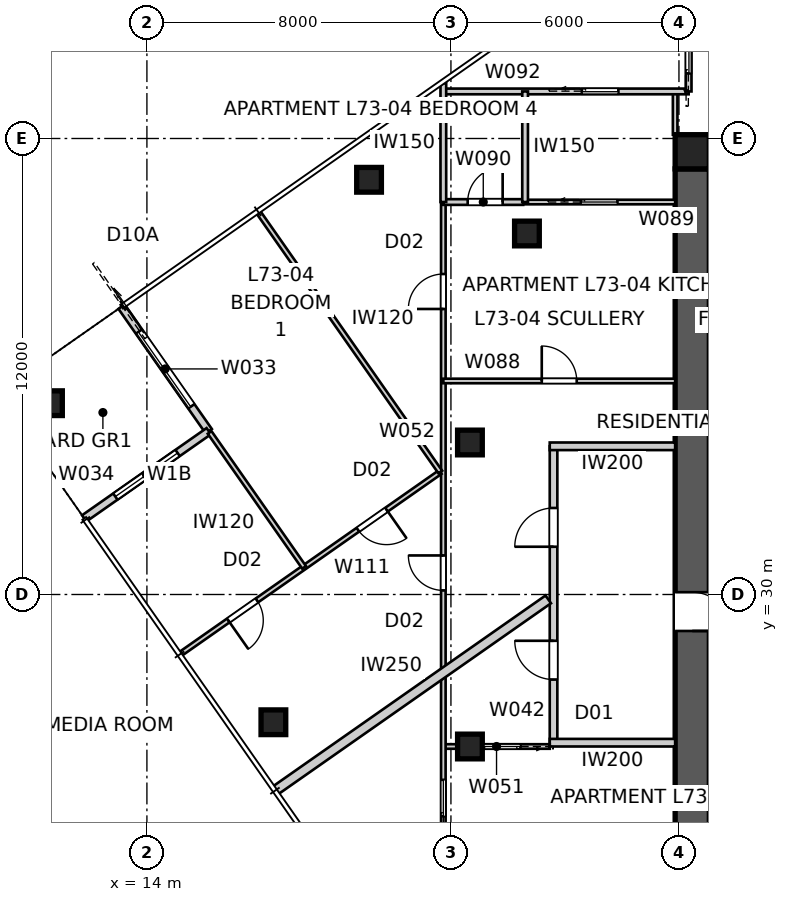
"""IFC4 building model, lengths in metres.
Left out: names, types, materials, properties, quantities, classifications, styles, units other than length and angle.
Written with IfcOpenShell. Run it as: python <this file> out.ifc"""

import sys

from ifc_helpers import new_model, si_unit, direction, frame, frame_2d, origin, origin_2d, place, context, subcontext, project, spatial, polyline, rectangle, outline, extrude, element, fill, save


model = new_model("IFC4")
c1 = context("Model", 3, precision=1e-05, world=origin(), true_north=direction((0.0, 1.0)))
c2 = subcontext(c1, "Body", "Model", "MODEL_VIEW")
j1 = project(units=[si_unit("LENGTHUNIT", "METRE"), si_unit("PLANEANGLEUNIT", "RADIAN")], contexts=[c1])
p1 = place(None, origin())
s1 = spatial("IfcSite", under=j1, at=p1, CompositionType="ELEMENT")
p2 = place(p1, origin())
s2 = spatial("IfcBuilding", under=s1, at=p2, CompositionType="ELEMENT")
p3 = place(p2, frame((0.0, 0.0, 264.2)))
s3 = spatial("IfcBuildingStorey", under=s2, at=p3, CompositionType="ELEMENT", Elevation=264.2)
p4 = place(p3, frame((28.8, 41.65, 0.0), z_axis=(0.0, 0.0, 1.0), x_axis=(1.0, 0.0, 0.0)))
e1 = element("IfcWall", 1, at=p4, inside=s3, PredefinedType="SHEAR", context=c2, shape_type="SweptSolid", body=[
    extrude(outline(polyline([(0.0, -0.45), (22.4, -0.45), (22.4, -0.025), (22.85, -0.025), (22.85, 0.025), (22.4, 0.025), (22.4, 0.45), (0.0, 0.45), (0.0, 0.025), (-0.45, 0.025), (-0.45, -0.025), (0.0, -0.025), (0.0, -0.45)])), origin(), (0.0, 0.0, 1.0), 3.4),
])
p5 = place(p3, frame((28.35, 41.2, 0.0), z_axis=(0.0, 0.0, 1.0), x_axis=(0.0, -1.0, 0.0)))
e2 = element("IfcWall", 2, at=p5, inside=s3, PredefinedType="SHEAR", context=c2, shape_type="SweptSolid", body=[
    extrude(outline(polyline([(0.0, -0.45), (22.4, -0.45), (22.4, -0.025), (22.85, -0.025), (22.85, 0.025), (22.4, 0.025), (22.4, 0.45), (0.0, 0.45), (0.0, 0.025), (-0.45, 0.025), (-0.45, -0.025), (0.0, -0.025), (0.0, -0.45)])), origin(), (0.0, 0.0, 1.0), 3.4),
])
p6 = place(p5, frame((11.14, 0.0, 0.0)))
e3 = element("IfcOpeningElement", 3, at=p6, cuts=e2, PredefinedType="OPENING", context=c2, shape_type="SweptSolid", body=[
    extrude(rectangle(XDim=1.02, YDim=2.4, at=frame_2d((0.51, 1.2))), frame((0.0, 0.46, 0.0), z_axis=(0.0, -1.0, 0.0), x_axis=(1.0, 0.0, 0.0)), (0.0, 0.0, 1.0), 0.92),
])
p7 = place(p3, frame((28.35, 41.65, 0.0), z_axis=(0.0, 0.0, 1.0), x_axis=(1.0, 0.0, 0.0)))
e4 = element("IfcColumn", 4, at=p7, inside=s3, PredefinedType="COLUMN", context=c2, shape_type="SweptSolid", body=[
    extrude(rectangle(XDim=0.9, YDim=0.9, at=origin_2d()), origin(), (0.0, 0.0, 1.0), 3.4),
])
for number, where, z_axis, x_axis in (
    (5, (19.845, 40.914, 0.0), (0.0, 0.0, 1.0), (1.0, 0.0, 0.0)),
    (6, (11.449, 35.034, 0.0), (0.0, 0.0, 1.0), (1.0, 0.0, 0.0)),
    (7, (17.328, 26.638, 0.0), (0.0, 0.0, 1.0), (1.0, 0.0, 0.0)),
):
    element("IfcColumn", number, at=place(p3, frame(where, z_axis=z_axis, x_axis=x_axis)), inside=s3, PredefinedType="COLUMN", context=c2, shape_type="SweptSolid", body=[
        extrude(rectangle(XDim=0.65, YDim=0.65, at=origin_2d()), origin(), (0.0, 0.0, 1.0), 3.2),
    ])
for number, where, z_axis, x_axis in (
    (8, (24.0, 39.5, 0.0), (0.0, 0.0, 1.0), (1.0, 0.0, 0.0)),
    (9, (22.5, 34.0, 0.0), (0.0, 0.0, 1.0), (1.0, 0.0, 0.0)),
    (10, (22.5, 26.0, 0.0), (0.0, 0.0, 1.0), (1.0, 0.0, 0.0)),
):
    element("IfcColumn", number, at=place(p3, frame(where, z_axis=z_axis, x_axis=x_axis)), inside=s3, PredefinedType="COLUMN", context=c2, shape_type="SweptSolid", body=[
        extrude(rectangle(XDim=0.65, YDim=0.65, at=origin_2d()), origin(), (0.0, 0.0, 1.0), 3.4),
    ])
p8 = place(p3, frame((13.333, 37.574, 0.0), z_axis=(0.0, 0.0, 1.0), x_axis=(0.573556557423, -0.819165963305, 0.0)))
e11 = element("IfcWall", 11, at=p8, inside=s3, PredefinedType="SOLIDWALL", context=c2, shape_type="SweptSolid", body=[
    extrude(rectangle(XDim=4.0, YDim=0.2, at=frame_2d((2.0, 0.0))), origin(), (0.0, 0.0, 1.0), 3.2),
])
p9 = place(p8, frame((0.8, 0.0, 0.0)))
e12 = element("IfcOpeningElement", 12, at=p9, cuts=e11, PredefinedType="OPENING", context=c2, shape_type="SweptSolid", body=[
    extrude(rectangle(XDim=2.4, YDim=2.1, at=frame_2d((1.2, 1.05))), frame((0.0, 0.11, 0.0), z_axis=(0.0, -1.0, 0.0), x_axis=(1.0, 0.0, 0.0)), (0.0, 0.0, 1.0), 0.22),
])
p10 = place(p3, frame((15.627, 34.298, 0.0), z_axis=(0.0, 0.0, 1.0), x_axis=(-0.819137286189, -0.573597512525, 0.0)))
e13 = element("IfcWall", 13, at=p10, inside=s3, PredefinedType="SOLIDWALL", context=c2, shape_type="SweptSolid", body=[
    extrude(rectangle(XDim=4.0, YDim=0.2, at=frame_2d((2.0, 0.0))), origin(), (0.0, 0.0, 1.0), 3.2),
])
p11 = place(p10, frame((1.0, 0.0, 0.4)))
e14 = element("IfcOpeningElement", 14, at=p11, cuts=e13, PredefinedType="OPENING", context=c2, shape_type="SweptSolid", body=[
    extrude(rectangle(XDim=2.0, YDim=1.8, at=frame_2d((1.0, 0.9))), frame((0.0, 0.11, 0.0), z_axis=(0.0, -1.0, 0.0), x_axis=(1.0, 0.0, 0.0)), (0.0, 0.0, 1.0), 0.22),
])
p12 = place(p3, frame((24.7, 26.1, 0.0), z_axis=(0.0, 0.0, 1.0), x_axis=(0.0, 1.0, 0.0)))
e15 = element("IfcWall", 15, at=p12, inside=s3, PredefinedType="PARTITIONING", context=c2, shape_type="SweptSolid", body=[
    extrude(rectangle(XDim=7.8, YDim=0.2, at=frame_2d((3.9, 0.0))), origin(), (0.0, 0.0, 1.0), 3.2),
])
p13 = place(p12, frame((1.662, 0.0, 0.0)))
e16 = element("IfcOpeningElement", 16, at=p13, cuts=e15, PredefinedType="OPENING", context=c2, shape_type="SweptSolid", body=[
    extrude(rectangle(XDim=1.02, YDim=2.34, at=frame_2d((0.51, 1.17))), frame((0.0, 0.11, 0.0), z_axis=(0.0, -1.0, 0.0), x_axis=(1.0, 0.0, 0.0)), (0.0, 0.0, 1.0), 0.22),
])
p14 = place(p12, frame((5.157, 0.0, 0.0)))
e17 = element("IfcOpeningElement", 17, at=p14, cuts=e15, PredefinedType="OPENING", context=c2, shape_type="SweptSolid", body=[
    extrude(rectangle(XDim=1.02, YDim=2.34, at=frame_2d((0.51, 1.17))), frame((0.0, 0.11, 0.0), z_axis=(0.0, -1.0, 0.0), x_axis=(1.0, 0.0, 0.0)), (0.0, 0.0, 1.0), 0.22),
])
for number, where, z_axis, x_axis in (
    (18, (27.9, 33.9, 0.0), (0.0, 0.0, 1.0), (-1.0, 0.0, 0.0)),
    (19, (27.9, 26.1, 0.0), (0.0, 0.0, 1.0), (-1.0, 0.0, 0.0)),
):
    element("IfcWall", number, at=place(p3, frame(where, z_axis=z_axis, x_axis=x_axis)), inside=s3, PredefinedType="PARTITIONING", context=c2, shape_type="SweptSolid", body=[
        extrude(rectangle(XDim=3.3, YDim=0.2, at=frame_2d((1.65, 0.0))), origin(), (0.0, 0.0, 1.0), 3.2),
    ])
p15 = place(p3, frame((17.369, 24.836, 0.0), z_axis=(0.0, 0.0, 1.0), x_axis=(0.819152220062, 0.573576185321, 0.0)))
e20 = element("IfcWall", 20, at=p15, inside=s3, PredefinedType="PARTITIONING", context=c2, shape_type="SweptSolid", body=[
    extrude(rectangle(XDim=8.779, YDim=0.25, at=frame_2d((4.39, 0.0))), origin(), (0.0, 0.0, 1.0), 3.2),
])
p16 = place(p3, frame((24.6, 26.0, 0.0), z_axis=(0.0, 0.0, 1.0), x_axis=(-1.0, 0.0, 0.0)))
e21 = element("IfcWall", 21, at=p16, inside=s3, PredefinedType="PARTITIONING", context=c2, shape_type="SweptSolid", body=[
    extrude(rectangle(XDim=2.8, YDim=0.12, at=frame_2d((1.4, 0.0))), origin(), (0.0, 0.0, 1.0), 3.2),
])
p17 = place(p16, frame((0.77, 0.0, 0.0)))
e22 = element("IfcOpeningElement", 22, at=p17, cuts=e21, PredefinedType="OPENING", context=c2, shape_type="SweptSolid", body=[
    extrude(rectangle(XDim=0.96, YDim=2.1, at=frame_2d((0.48, 1.05))), frame((0.0, 0.07, 0.0), z_axis=(0.0, -1.0, 0.0), x_axis=(1.0, 0.0, 0.0)), (0.0, 0.0, 1.0), 0.14),
])
p18 = place(p3, frame((21.8, 18.578, 0.0), z_axis=(0.0, 0.0, 1.0), x_axis=(0.0, 1.0, 0.0)))
e23 = element("IfcWall", 23, at=p18, inside=s3, PredefinedType="PARTITIONING", context=c2, shape_type="SweptSolid", body=[
    extrude(rectangle(XDim=21.75, YDim=0.12, at=frame_2d((10.875, 0.0))), origin(), (0.0, 0.0, 1.0), 3.2),
])
p19 = place(p18, frame((11.53, 0.0, 0.0)))
e24 = element("IfcOpeningElement", 24, at=p19, cuts=e23, PredefinedType="OPENING", context=c2, shape_type="SweptSolid", body=[
    extrude(rectangle(XDim=0.92, YDim=2.34, at=frame_2d((0.46, 1.17))), frame((0.0, 0.07, 0.0), z_axis=(0.0, -1.0, 0.0), x_axis=(1.0, 0.0, 0.0)), (0.0, 0.0, 1.0), 0.14),
])
p20 = place(p18, frame((5.585, 0.0, 0.0)))
e25 = element("IfcOpeningElement", 25, at=p20, cuts=e23, PredefinedType="OPENING", context=c2, shape_type="SweptSolid", body=[
    extrude(rectangle(XDim=0.96, YDim=2.1, at=frame_2d((0.48, 1.05))), frame((0.0, 0.07, 0.0), z_axis=(0.0, -1.0, 0.0), x_axis=(1.0, 0.0, 0.0)), (0.0, 0.0, 1.0), 0.14),
])
p21 = place(p18, frame((18.936, 0.0, 0.0)))
e26 = element("IfcOpeningElement", 26, at=p21, cuts=e23, PredefinedType="OPENING", context=c2, shape_type="SweptSolid", body=[
    extrude(rectangle(XDim=0.92, YDim=2.34, at=frame_2d((0.46, 1.17))), frame((0.0, 0.07, 0.0), z_axis=(0.0, -1.0, 0.0), x_axis=(1.0, 0.0, 0.0)), (0.0, 0.0, 1.0), 0.14),
])
p22 = place(p3, frame((21.8, 35.619, 0.0), z_axis=(0.0, 0.0, 1.0), x_axis=(1.0, 0.0, 0.0)))
e27 = element("IfcWall", 27, at=p22, inside=s3, PredefinedType="PARTITIONING", context=c2, shape_type="SweptSolid", body=[
    extrude(rectangle(XDim=6.1, YDim=0.12, at=frame_2d((3.05, 0.0))), origin(), (0.0, 0.0, 1.0), 3.2),
])
p23 = place(p22, frame((2.59, 0.0, 0.0)))
e28 = element("IfcOpeningElement", 28, at=p23, cuts=e27, PredefinedType="OPENING", context=c2, shape_type="SweptSolid", body=[
    extrude(rectangle(XDim=0.92, YDim=2.34, at=frame_2d((0.46, 1.17))), frame((0.0, 0.07, 0.0), z_axis=(0.0, -1.0, 0.0), x_axis=(1.0, 0.0, 0.0)), (0.0, 0.0, 1.0), 0.14),
])
p24 = place(p3, frame((23.902, 40.328, 0.0), z_axis=(0.0, 0.0, 1.0), x_axis=(1.0, 0.0, 0.0)))
e29 = element("IfcWall", 29, at=p24, inside=s3, PredefinedType="PARTITIONING", context=c2, shape_type="SweptSolid", body=[
    extrude(rectangle(XDim=3.998, YDim=0.12, at=frame_2d((1.999, 0.0))), origin(), (0.0, 0.0, 1.0), 3.2),
])
p25 = place(p24, frame((1.519, 0.0, 0.0)))
e30 = element("IfcOpeningElement", 30, at=p25, cuts=e29, PredefinedType="OPENING", context=c2, shape_type="SweptSolid", body=[
    extrude(rectangle(XDim=0.96, YDim=2.1, at=frame_2d((0.48, 1.05))), frame((0.0, 0.07, 0.0), z_axis=(0.0, -1.0, 0.0), x_axis=(1.0, 0.0, 0.0)), (0.0, 0.0, 1.0), 0.14),
])
p26 = place(p3, frame((21.8, 40.328, 0.0), z_axis=(0.0, 0.0, 1.0), x_axis=(1.0, 0.0, 0.0)))
e31 = element("IfcWall", 31, at=p26, inside=s3, PredefinedType="SOLIDWALL", context=c2, shape_type="SweptSolid", body=[
    extrude(rectangle(XDim=2.102, YDim=0.15, at=frame_2d((1.051, 0.0))), origin(), (0.0, 0.0, 1.0), 3.2),
])
p27 = place(p26, frame((0.641, 0.0, 0.0)))
e32 = element("IfcOpeningElement", 32, at=p27, cuts=e31, PredefinedType="OPENING", context=c2, shape_type="SweptSolid", body=[
    extrude(rectangle(XDim=0.92, YDim=2.34, at=frame_2d((0.46, 1.17))), frame((0.0, 0.085, 0.0), z_axis=(0.0, -1.0, 0.0), x_axis=(1.0, 0.0, 0.0)), (0.0, 0.0, 1.0), 0.17),
])
p28 = place(p3, frame((27.9, 42.1, 0.0), z_axis=(0.0, 0.0, 1.0), x_axis=(0.0, 1.0, 0.0)))
e33 = element("IfcWall", 33, at=p28, inside=s3, PredefinedType="PARTITIONING", context=c2, shape_type="SweptSolid", body=[
    extrude(rectangle(XDim=1.138, YDim=0.12, at=frame_2d((0.569, 0.0))), origin(), (0.0, 0.0, 1.0), 3.2),
])
p29 = place(p3, frame((21.8, 43.238, 0.0), z_axis=(0.0, 0.0, 1.0), x_axis=(1.0, 0.0, 0.0)))
e34 = element("IfcWall", 34, at=p29, inside=s3, PredefinedType="SOLIDWALL", context=c2, shape_type="SweptSolid", body=[
    extrude(rectangle(XDim=6.455, YDim=0.15, at=frame_2d((3.228, 0.0))), origin(), (0.0, 0.0, 1.0), 3.2),
])
p30 = place(p29, frame((3.646, 0.0, 0.0)))
e35 = element("IfcOpeningElement", 35, at=p30, cuts=e34, PredefinedType="OPENING", context=c2, shape_type="SweptSolid", body=[
    extrude(rectangle(XDim=0.96, YDim=2.1, at=frame_2d((0.48, 1.05))), frame((0.0, 0.085, 0.0), z_axis=(0.0, -1.0, 0.0), x_axis=(1.0, 0.0, 0.0)), (0.0, 0.0, 1.0), 0.17),
])
p31 = place(p3, frame((28.255, 43.238, 0.0), z_axis=(0.0, 0.0, 1.0), x_axis=(0.0, 1.0, 0.0)))
e36 = element("IfcWall", 36, at=p31, inside=s3, PredefinedType="SOLIDWALL", context=c2, shape_type="SweptSolid", body=[
    extrude(rectangle(XDim=4.736, YDim=0.15, at=frame_2d((2.368, 0.0))), origin(), (0.0, 0.0, 1.0), 3.2),
])
p32 = place(p31, frame((2.262, 0.0, 0.0)))
e37 = element("IfcOpeningElement", 37, at=p32, cuts=e36, PredefinedType="OPENING", context=c2, shape_type="SweptSolid", body=[
    extrude(rectangle(XDim=0.92, YDim=2.34, at=frame_2d((0.46, 1.17))), frame((0.0, 0.085, 0.0), z_axis=(0.0, -1.0, 0.0), x_axis=(1.0, 0.0, 0.0)), (0.0, 0.0, 1.0), 0.17),
])
p33 = place(p31, frame((0.475, 0.0, 0.0)))
e38 = element("IfcOpeningElement", 38, at=p33, cuts=e36, PredefinedType="OPENING", context=c2, shape_type="SweptSolid", body=[
    extrude(rectangle(XDim=0.96, YDim=2.0, at=frame_2d((0.48, 1.0))), frame((0.0, 0.085, 0.0), z_axis=(0.0, -1.0, 0.0), x_axis=(1.0, 0.0, 0.0)), (0.0, 0.0, 1.0), 0.17),
])
p34 = place(p3, frame((23.952, 40.328, 0.0), z_axis=(0.0, 0.0, 1.0), x_axis=(0.0, 1.0, 0.0)))
e39 = element("IfcWall", 39, at=p34, inside=s3, PredefinedType="SOLIDWALL", context=c2, shape_type="SweptSolid", body=[
    extrude(rectangle(XDim=2.91, YDim=0.15, at=frame_2d((1.455, 0.0))), origin(), (0.0, 0.0, 1.0), 3.2),
])
p35 = place(p3, frame((21.8, 40.328, 0.0), z_axis=(0.0, 0.0, 1.0), x_axis=(0.0, 1.0, 0.0)))
e40 = element("IfcWall", 40, at=p35, inside=s3, PredefinedType="SOLIDWALL", context=c2, shape_type="SweptSolid", body=[
    extrude(rectangle(XDim=3.126, YDim=0.15, at=frame_2d((1.563, 0.0))), origin(), (0.0, 0.0, 1.0), 3.2),
])
p36 = place(p3, frame((21.72, 33.223, 0.0), z_axis=(0.0, 0.0, 1.0), x_axis=(-0.819152099525, -0.573576357466, 0.0)))
e41 = element("IfcWall", 41, at=p36, inside=s3, PredefinedType="PARTITIONING", context=c2, shape_type="SweptSolid", body=[
    extrude(rectangle(XDim=8.335, YDim=0.12, at=frame_2d((4.167, 0.0))), origin(), (0.0, 0.0, 1.0), 3.2),
])
p37 = place(p36, frame((1.728, 0.0, 0.0)))
e42 = element("IfcOpeningElement", 42, at=p37, cuts=e41, PredefinedType="OPENING", context=c2, shape_type="SweptSolid", body=[
    extrude(rectangle(XDim=0.92, YDim=2.34, at=frame_2d((0.46, 1.17))), frame((0.0, 0.07, 0.0), z_axis=(0.0, -1.0, 0.0), x_axis=(1.0, 0.0, 0.0)), (0.0, 0.0, 1.0), 0.14),
])
p38 = place(p36, frame((5.89, 0.0, 0.0)))
e43 = element("IfcOpeningElement", 43, at=p38, cuts=e41, PredefinedType="OPENING", context=c2, shape_type="SweptSolid", body=[
    extrude(rectangle(XDim=0.92, YDim=2.34, at=frame_2d((0.46, 1.17))), frame((0.0, 0.07, 0.0), z_axis=(0.0, -1.0, 0.0), x_axis=(1.0, 0.0, 0.0)), (0.0, 0.0, 1.0), 0.14),
])
p39 = place(p3, frame((16.94, 40.051, 0.0), z_axis=(0.0, 0.0, 1.0), x_axis=(0.573576357466, -0.819152099525, 0.0)))
e44 = element("IfcWall", 44, at=p39, inside=s3, PredefinedType="PARTITIONING", context=c2, shape_type="SweptSolid", body=[
    extrude(rectangle(XDim=8.335, YDim=0.12, at=frame_2d((4.167, 0.0))), origin(), (0.0, 0.0, 1.0), 3.2),
])
p40 = place(p3, frame((18.137, 30.714, 0.0), z_axis=(0.0, 0.0, 1.0), x_axis=(-0.573594626521, 0.819139307094, 0.0)))
e45 = element("IfcWall", 45, at=p40, inside=s3, PredefinedType="PARTITIONING", context=c2, shape_type="SweptSolid", body=[
    extrude(rectangle(XDim=4.335, YDim=0.12, at=frame_2d((2.167, 0.0))), origin(), (0.0, 0.0, 1.0), 3.2),
])
p41 = place(p9, origin())
e46 = element("IfcDoor", 46, at=p41, inside=s3, OperationType="SLIDING_TO_LEFT", PredefinedType="DOOR", context=c2, shape_type="SweptSolid", body=[
    extrude(rectangle(XDim=2.4, YDim=2.1, at=frame_2d((1.2, 1.05))), frame((0.0, 0.025, 0.0), z_axis=(0.0, -1.0, 0.0), x_axis=(1.0, 0.0, 0.0)), (0.0, 0.0, 1.0), 0.05),
])
fill(e12, e46)
p42 = place(p11, origin())
e47 = element("IfcWindow", 47, at=p42, inside=s3, PartitioningType="SINGLE_PANEL", PredefinedType="WINDOW", context=c2, shape_type="SweptSolid", body=[
    extrude(rectangle(XDim=2.0, YDim=1.8, at=frame_2d((1.0, 0.9))), frame((0.0, 0.03, 0.0), z_axis=(0.0, -1.0, 0.0), x_axis=(1.0, 0.0, 0.0)), (0.0, 0.0, 1.0), 0.06),
])
fill(e14, e47)
p43 = place(p13, origin())
e48 = element("IfcDoor", 48, at=p43, inside=s3, OperationType="SINGLE_SWING_RIGHT", PredefinedType="DOOR", context=c2, shape_type="SweptSolid", body=[
    extrude(rectangle(XDim=1.02, YDim=2.34, at=frame_2d((0.51, 1.17))), frame((0.0, 0.025, 0.0), z_axis=(0.0, -1.0, 0.0), x_axis=(1.0, 0.0, 0.0)), (0.0, 0.0, 1.0), 0.05),
])
fill(e16, e48)
p44 = place(p14, origin())
e49 = element("IfcDoor", 49, at=p44, inside=s3, OperationType="SINGLE_SWING_LEFT", PredefinedType="DOOR", context=c2, shape_type="SweptSolid", body=[
    extrude(rectangle(XDim=1.02, YDim=2.34, at=frame_2d((0.51, 1.17))), frame((0.0, 0.025, 0.0), z_axis=(0.0, -1.0, 0.0), x_axis=(1.0, 0.0, 0.0)), (0.0, 0.0, 1.0), 0.05),
])
fill(e17, e49)
p45 = place(p17, origin())
e50 = element("IfcDoor", 50, at=p45, inside=s3, OperationType="SLIDING_TO_LEFT", PredefinedType="DOOR", context=c2, shape_type="SweptSolid", body=[
    extrude(rectangle(XDim=0.96, YDim=2.1, at=frame_2d((0.48, 1.05))), frame((0.0, 0.025, 0.0), z_axis=(0.0, -1.0, 0.0), x_axis=(1.0, 0.0, 0.0)), (0.0, 0.0, 1.0), 0.05),
])
fill(e22, e50)
p46 = place(p23, origin())
e51 = element("IfcDoor", 51, at=p46, inside=s3, OperationType="SINGLE_SWING_LEFT", PredefinedType="DOOR", context=c2, shape_type="SweptSolid", body=[
    extrude(rectangle(XDim=0.92, YDim=2.34, at=frame_2d((0.46, 1.17))), frame((0.0, 0.025, 0.0), z_axis=(0.0, -1.0, 0.0), x_axis=(1.0, 0.0, 0.0)), (0.0, 0.0, 1.0), 0.05),
])
fill(e28, e51)
p47 = place(p19, origin())
e52 = element("IfcDoor", 52, at=p47, inside=s3, OperationType="SINGLE_SWING_RIGHT", PredefinedType="DOOR", context=c2, shape_type="SweptSolid", body=[
    extrude(rectangle(XDim=0.92, YDim=2.34, at=frame_2d((0.46, 1.17))), frame((0.0, 0.025, 0.0), z_axis=(0.0, -1.0, 0.0), x_axis=(1.0, 0.0, 0.0)), (0.0, 0.0, 1.0), 0.05),
])
fill(e24, e52)
p48 = place(p20, origin())
e53 = element("IfcDoor", 53, at=p48, inside=s3, OperationType="SLIDING_TO_LEFT", PredefinedType="DOOR", context=c2, shape_type="SweptSolid", body=[
    extrude(rectangle(XDim=0.96, YDim=2.1, at=frame_2d((0.48, 1.05))), frame((0.0, 0.025, 0.0), z_axis=(0.0, -1.0, 0.0), x_axis=(1.0, 0.0, 0.0)), (0.0, 0.0, 1.0), 0.05),
])
fill(e25, e53)
p49 = place(p21, origin())
e54 = element("IfcDoor", 54, at=p49, inside=s3, OperationType="SINGLE_SWING_LEFT", PredefinedType="DOOR", context=c2, shape_type="SweptSolid", body=[
    extrude(rectangle(XDim=0.92, YDim=2.34, at=frame_2d((0.46, 1.17))), frame((0.0, 0.025, 0.0), z_axis=(0.0, -1.0, 0.0), x_axis=(1.0, 0.0, 0.0)), (0.0, 0.0, 1.0), 0.05),
])
fill(e26, e54)
p50 = place(p25, origin())
e55 = element("IfcDoor", 55, at=p50, inside=s3, OperationType="SLIDING_TO_LEFT", PredefinedType="DOOR", context=c2, shape_type="SweptSolid", body=[
    extrude(rectangle(XDim=0.96, YDim=2.1, at=frame_2d((0.48, 1.05))), frame((0.0, 0.025, 0.0), z_axis=(0.0, -1.0, 0.0), x_axis=(1.0, 0.0, 0.0)), (0.0, 0.0, 1.0), 0.05),
])
fill(e30, e55)
p51 = place(p27, origin())
e56 = element("IfcDoor", 56, at=p51, inside=s3, OperationType="SINGLE_SWING_RIGHT", PredefinedType="DOOR", context=c2, shape_type="SweptSolid", body=[
    extrude(rectangle(XDim=0.92, YDim=2.34, at=frame_2d((0.46, 1.17))), frame((0.0, 0.025, 0.0), z_axis=(0.0, -1.0, 0.0), x_axis=(1.0, 0.0, 0.0)), (0.0, 0.0, 1.0), 0.05),
])
fill(e32, e56)
p52 = place(p30, origin())
e57 = element("IfcDoor", 57, at=p52, inside=s3, OperationType="SLIDING_TO_LEFT", PredefinedType="DOOR", context=c2, shape_type="SweptSolid", body=[
    extrude(rectangle(XDim=0.96, YDim=2.1, at=frame_2d((0.48, 1.05))), frame((0.0, 0.025, 0.0), z_axis=(0.0, -1.0, 0.0), x_axis=(1.0, 0.0, 0.0)), (0.0, 0.0, 1.0), 0.05),
])
fill(e35, e57)
p53 = place(p33, origin())
e58 = element("IfcDoor", 58, at=p53, inside=s3, OperationType="SLIDING_TO_LEFT", PredefinedType="DOOR", context=c2, shape_type="SweptSolid", body=[
    extrude(rectangle(XDim=0.96, YDim=2.0, at=frame_2d((0.48, 1.0))), frame((0.0, 0.025, 0.0), z_axis=(0.0, -1.0, 0.0), x_axis=(1.0, 0.0, 0.0)), (0.0, 0.0, 1.0), 0.05),
])
fill(e38, e58)
p54 = place(p37, origin())
e59 = element("IfcDoor", 59, at=p54, inside=s3, OperationType="SINGLE_SWING_LEFT", PredefinedType="DOOR", context=c2, shape_type="SweptSolid", body=[
    extrude(rectangle(XDim=0.92, YDim=2.34, at=frame_2d((0.46, 1.17))), frame((0.0, 0.025, 0.0), z_axis=(0.0, -1.0, 0.0), x_axis=(1.0, 0.0, 0.0)), (0.0, 0.0, 1.0), 0.05),
])
fill(e42, e59)
p55 = place(p38, origin())
e60 = element("IfcDoor", 60, at=p55, inside=s3, OperationType="SINGLE_SWING_RIGHT", PredefinedType="DOOR", context=c2, shape_type="SweptSolid", body=[
    extrude(rectangle(XDim=0.92, YDim=2.34, at=frame_2d((0.46, 1.17))), frame((0.0, 0.025, 0.0), z_axis=(0.0, -1.0, 0.0), x_axis=(1.0, 0.0, 0.0)), (0.0, 0.0, 1.0), 0.05),
])
fill(e43, e60)
p56 = place(p6, origin())
e61 = element("IfcDoor", 61, at=p56, inside=s3, OperationType="SINGLE_SWING_RIGHT", PredefinedType="DOOR", context=c2, shape_type="SweptSolid", body=[
    extrude(rectangle(XDim=1.02, YDim=2.4, at=frame_2d((0.51, 1.2))), frame((0.0, 0.025, 0.0), z_axis=(0.0, -1.0, 0.0), x_axis=(1.0, 0.0, 0.0)), (0.0, 0.0, 1.0), 0.05),
])
fill(e3, e61)
save(model, sys.argv[1])
